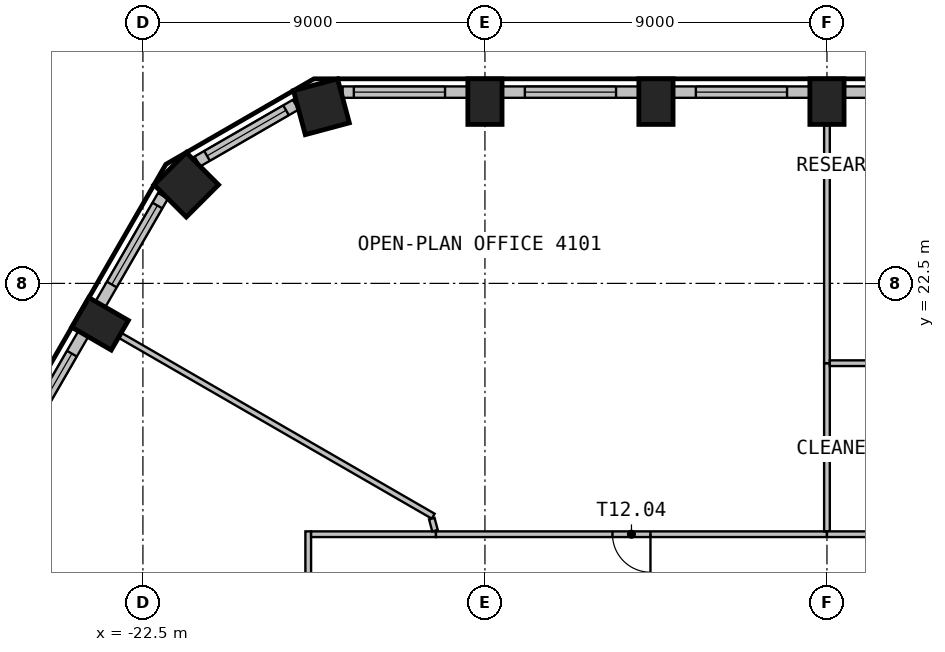
"""IFC4 building model, lengths in metres.
Left out: names, types, materials, properties, quantities, classifications, styles, units other than length and angle.
Written with IfcOpenShell. Run it as: python <this file> out.ifc"""

import sys

from ifc_helpers import new_model, si_unit, direction, frame, frame_2d, origin, origin_2d, place, context, subcontext, project, spatial, rectangle, extrude, element, fill, save


model = new_model("IFC4")
c1 = context("Model", 3, precision=1e-05, world=origin(), true_north=direction((0.0, 1.0)))
c2 = subcontext(c1, "Body", "Model", "MODEL_VIEW")
j1 = project(units=[si_unit("LENGTHUNIT", "METRE"), si_unit("PLANEANGLEUNIT", "RADIAN")], contexts=[c1])
p1 = place(None, origin())
s1 = spatial("IfcSite", under=j1, at=p1, CompositionType="ELEMENT")
p2 = place(p1, origin())
s2 = spatial("IfcBuilding", under=s1, at=p2, CompositionType="ELEMENT")
p3 = place(p2, frame((0.0, 0.0, 167.7)))
s3 = spatial("IfcBuildingStorey", under=s2, at=p3, CompositionType="ELEMENT", Elevation=167.7)
for number, where, z_axis, x_axis in (
    (1, (-4.5, 27.283, 0.0), (0.0, 0.0, 1.0), (-1.0, 0.0, 0.0)),
    (2, (-9.0, 27.283, 0.0), (0.0, 0.0, 1.0), (-1.0, 0.0, 0.0)),
    (3, (-13.5, 27.283, 0.0), (0.0, 0.0, 1.0), (-1.0, 0.0, 0.0)),
):
    element("IfcColumn", number, at=place(p3, frame(where, z_axis=z_axis, x_axis=x_axis)), inside=s3, PredefinedType="COLUMN", context=c2, shape_type="SweptSolid", body=[
        extrude(rectangle(XDim=0.9, YDim=1.2, at=origin_2d()), origin(), (0.0, 0.0, 1.0), 3.575),
    ])
for number, where, z_axis, x_axis in (
    (4, (-17.803, 27.148, 0.0), (0.0, 0.0, 1.0), (-0.966, -0.259, 0.0)),
    (5, (-21.359, 25.095, 0.0), (0.0, 0.0, 1.0), (-0.707, -0.707, 0.0)),
):
    element("IfcColumn", number, at=place(p3, frame(where, z_axis=z_axis, x_axis=x_axis)), inside=s3, PredefinedType="COLUMN", context=c2, shape_type="SweptSolid", body=[
        extrude(rectangle(XDim=1.2, YDim=1.2, at=origin_2d()), origin(), (0.0, 0.0, 1.0), 3.575),
    ])
p4 = place(p3, frame((-23.627, 21.436, 0.0), z_axis=(0.0, 0.0, 1.0), x_axis=(-0.5, -0.866025403784, 0.0)))
e6 = element("IfcColumn", 6, at=p4, inside=s3, PredefinedType="COLUMN", context=c2, shape_type="SweptSolid", body=[
    extrude(rectangle(XDim=0.9, YDim=1.2, at=origin_2d()), origin(), (0.0, 0.0, 1.0), 3.575),
])
p5 = place(p3, frame((-0.45, 27.533, 0.0), z_axis=(0.0, 0.0, 1.0), x_axis=(-1.0, 0.0, 0.0)))
e7 = element("IfcWall", 7, at=p5, inside=s3, PredefinedType="SOLIDWALL", context=c2, shape_type="SweptSolid", body=[
    extrude(rectangle(XDim=3.599, YDim=0.3, at=frame_2d((1.8, 0.0))), origin(), (0.0, 0.0, 1.0), 3.575),
])
p6 = place(p5, frame((0.6, 0.0, 0.9)))
e8 = element("IfcOpeningElement", 8, at=p6, cuts=e7, PredefinedType="OPENING", context=c2, shape_type="SweptSolid", body=[
    extrude(rectangle(XDim=2.4, YDim=2.1, at=frame_2d((1.2, 1.05))), frame((0.0, 0.16, 0.0), z_axis=(0.0, -1.0, 0.0), x_axis=(1.0, 0.0, 0.0)), (0.0, 0.0, 1.0), 0.32),
])
p7 = place(p3, frame((-4.95, 27.533, 0.0), z_axis=(0.0, 0.0, 1.0), x_axis=(-1.0, 0.0, 0.0)))
e9 = element("IfcWall", 9, at=p7, inside=s3, PredefinedType="SOLIDWALL", context=c2, shape_type="SweptSolid", body=[
    extrude(rectangle(XDim=3.599, YDim=0.3, at=frame_2d((1.8, 0.0))), origin(), (0.0, 0.0, 1.0), 3.575),
])
p8 = place(p7, frame((0.6, 0.0, 0.9)))
e10 = element("IfcOpeningElement", 10, at=p8, cuts=e9, PredefinedType="OPENING", context=c2, shape_type="SweptSolid", body=[
    extrude(rectangle(XDim=2.4, YDim=2.1, at=frame_2d((1.2, 1.05))), frame((0.0, 0.16, 0.0), z_axis=(0.0, -1.0, 0.0), x_axis=(1.0, 0.0, 0.0)), (0.0, 0.0, 1.0), 0.32),
])
p9 = place(p3, frame((-9.45, 27.533, 0.0), z_axis=(0.0, 0.0, 1.0), x_axis=(-1.0, 0.0, 0.0)))
e11 = element("IfcWall", 11, at=p9, inside=s3, PredefinedType="SOLIDWALL", context=c2, shape_type="SweptSolid", body=[
    extrude(rectangle(XDim=3.599, YDim=0.3, at=frame_2d((1.8, 0.0))), origin(), (0.0, 0.0, 1.0), 3.575),
])
p10 = place(p9, frame((0.6, 0.0, 0.9)))
e12 = element("IfcOpeningElement", 12, at=p10, cuts=e11, PredefinedType="OPENING", context=c2, shape_type="SweptSolid", body=[
    extrude(rectangle(XDim=2.4, YDim=2.1, at=frame_2d((1.2, 1.05))), frame((0.0, 0.16, 0.0), z_axis=(0.0, -1.0, 0.0), x_axis=(1.0, 0.0, 0.0)), (0.0, 0.0, 1.0), 0.32),
])
p11 = place(p3, frame((-13.95, 27.533, 0.0), z_axis=(0.0, 0.0, 1.0), x_axis=(-1.0, 0.0, 0.0)))
e13 = element("IfcWall", 13, at=p11, inside=s3, PredefinedType="SOLIDWALL", context=c2, shape_type="SweptSolid", body=[
    extrude(rectangle(XDim=3.294, YDim=0.3, at=frame_2d((1.647, 0.0))), origin(), (0.0, 0.0, 1.0), 3.575),
])
p12 = place(p11, frame((0.6, 0.0, 0.9)))
e14 = element("IfcOpeningElement", 14, at=p12, cuts=e13, PredefinedType="OPENING", context=c2, shape_type="SweptSolid", body=[
    extrude(rectangle(XDim=2.4, YDim=2.1, at=frame_2d((1.2, 1.05))), frame((0.0, 0.16, 0.0), z_axis=(0.0, -1.0, 0.0), x_axis=(1.0, 0.0, 0.0)), (0.0, 0.0, 1.0), 0.32),
])
p13 = place(p3, frame((-18.479, 27.202, 0.0), z_axis=(0.0, 0.0, 1.0), x_axis=(-0.866012844897, -0.500021752, 0.0)))
e15 = element("IfcWall", 15, at=p13, inside=s3, PredefinedType="SOLIDWALL", context=c2, shape_type="SweptSolid", body=[
    extrude(rectangle(XDim=2.989, YDim=0.3, at=frame_2d((1.495, 0.0))), origin(), (0.0, 0.0, 1.0), 3.575),
])
p14 = place(p13, frame((0.295, 0.0, 0.9)))
e16 = element("IfcOpeningElement", 16, at=p14, cuts=e15, PredefinedType="OPENING", context=c2, shape_type="SweptSolid", body=[
    extrude(rectangle(XDim=2.4, YDim=2.1, at=frame_2d((1.2, 1.05))), frame((0.0, 0.16, 0.0), z_axis=(0.0, -1.0, 0.0), x_axis=(1.0, 0.0, 0.0)), (0.0, 0.0, 1.0), 0.32),
])
p15 = place(p3, frame((-21.972, 24.803, 0.0), z_axis=(0.0, 0.0, 1.0), x_axis=(-0.500036802197, -0.866004154983, 0.0)))
e17 = element("IfcWall", 17, at=p15, inside=s3, PredefinedType="SOLIDWALL", context=c2, shape_type="SweptSolid", body=[
    extrude(rectangle(XDim=3.294, YDim=0.3, at=frame_2d((1.647, 0.0))), origin(), (0.0, 0.0, 1.0), 3.575),
])
p16 = place(p15, frame((0.294, 0.0, 0.9)))
e18 = element("IfcOpeningElement", 18, at=p16, cuts=e17, PredefinedType="OPENING", context=c2, shape_type="SweptSolid", body=[
    extrude(rectangle(XDim=2.4, YDim=2.1, at=frame_2d((1.2, 1.05))), frame((0.0, 0.16, 0.0), z_axis=(0.0, -1.0, 0.0), x_axis=(1.0, 0.0, 0.0)), (0.0, 0.0, 1.0), 0.32),
])
p17 = place(p3, frame((-24.069, 21.17, 0.0), z_axis=(0.0, 0.0, 1.0), x_axis=(-0.500027802648, -0.866009351323, 0.0)))
e19 = element("IfcWall", 19, at=p17, inside=s3, PredefinedType="SOLIDWALL", context=c2, shape_type="SweptSolid", body=[
    extrude(rectangle(XDim=3.599, YDim=0.3, at=frame_2d((1.799, 0.0))), origin(), (0.0, 0.0, 1.0), 3.575),
])
p18 = place(p17, frame((0.6, 0.0, 0.9)))
e20 = element("IfcOpeningElement", 20, at=p18, cuts=e19, PredefinedType="OPENING", context=c2, shape_type="SweptSolid", body=[
    extrude(rectangle(XDim=2.4, YDim=2.1, at=frame_2d((1.2, 1.05))), frame((0.0, 0.16, 0.0), z_axis=(0.0, -1.0, 0.0), x_axis=(1.0, 0.0, 0.0)), (0.0, 0.0, 1.0), 0.32),
])
p19 = place(p3, frame((-23.09, 21.126, 0.0), z_axis=(0.0, 0.0, 1.0), x_axis=(0.866011447264, -0.500024172624, 0.0)))
e21 = element("IfcWall", 21, at=p19, inside=s3, PredefinedType="PARTITIONING", context=c2, shape_type="SweptSolid", body=[
    extrude(rectangle(XDim=9.502, YDim=0.15, at=frame_2d((4.751, 0.0))), origin(), (0.0, 0.0, 1.0), 3.575),
])
p20 = place(p3, frame((-18.15, 15.975, 0.0), z_axis=(0.0, 0.0, 1.0), x_axis=(0.0, -1.0, 0.0)))
e22 = element("IfcWall", 22, at=p20, inside=s3, PredefinedType="PARTITIONING", context=c2, shape_type="SweptSolid", body=[
    extrude(rectangle(XDim=13.604, YDim=0.15, at=frame_2d((6.802, 0.0))), origin(), (0.0, 0.0, 1.0), 3.575),
])
p21 = place(p20, frame((6.302, 0.0, 0.0)))
e23 = element("IfcOpeningElement", 23, at=p21, cuts=e22, PredefinedType="OPENING", context=c2, shape_type="SweptSolid", body=[
    extrude(rectangle(XDim=1.0, YDim=2.1, at=frame_2d((0.5, 1.05))), frame((0.0, 0.085, 0.0), z_axis=(0.0, -1.0, 0.0), x_axis=(1.0, 0.0, 0.0)), (0.0, 0.0, 1.0), 0.17),
])
p22 = place(p3, frame((-14.789, 15.9, 0.0), z_axis=(0.0, 0.0, 1.0), x_axis=(-1.0, 0.0, 0.0)))
e24 = element("IfcWall", 24, at=p22, inside=s3, PredefinedType="PARTITIONING", context=c2, shape_type="SweptSolid", body=[
    extrude(rectangle(XDim=3.286, YDim=0.15, at=frame_2d((1.643, 0.0))), origin(), (0.0, 0.0, 1.0), 3.575),
])
p23 = place(p3, frame((-14.899, 16.311, 0.0), z_axis=(0.0, 0.0, 1.0), x_axis=(0.257478443243, -0.966284042746, 0.0)))
e25 = element("IfcWall", 25, at=p23, inside=s3, PredefinedType="PARTITIONING", context=c2, shape_type="SweptSolid", body=[
    extrude(rectangle(XDim=0.33, YDim=0.15, at=frame_2d((0.165, 0.0))), origin(), (0.0, 0.0, 1.0), 3.575),
])
p24 = place(p3, frame((-4.5, 15.9, 0.0), z_axis=(0.0, 0.0, 1.0), x_axis=(-1.0, 0.0, 0.0)))
e26 = element("IfcWall", 26, at=p24, inside=s3, PredefinedType="PARTITIONING", context=c2, shape_type="SweptSolid", body=[
    extrude(rectangle(XDim=10.289, YDim=0.15, at=frame_2d((5.145, 0.0))), origin(), (0.0, 0.0, 1.0), 3.575),
])
p25 = place(p24, frame((4.645, 0.0, 0.0)))
e27 = element("IfcOpeningElement", 27, at=p25, cuts=e26, PredefinedType="OPENING", context=c2, shape_type="SweptSolid", body=[
    extrude(rectangle(XDim=1.0, YDim=2.1, at=frame_2d((0.5, 1.05))), frame((0.0, 0.085, 0.0), z_axis=(0.0, -1.0, 0.0), x_axis=(1.0, 0.0, 0.0)), (0.0, 0.0, 1.0), 0.17),
])
p26 = place(p3, frame((-4.5, 20.4, 0.0), z_axis=(0.0, 0.0, 1.0), x_axis=(0.0, -1.0, 0.0)))
e28 = element("IfcWall", 28, at=p26, inside=s3, PredefinedType="PARTITIONING", context=c2, shape_type="SweptSolid", body=[
    extrude(rectangle(XDim=4.425, YDim=0.15, at=frame_2d((2.212, 0.0))), origin(), (0.0, 0.0, 1.0), 3.575),
])
p27 = place(p3, frame((0.075, 15.9, 0.0), z_axis=(0.0, 0.0, 1.0), x_axis=(-1.0, 0.0, 0.0)))
e29 = element("IfcWall", 29, at=p27, inside=s3, PredefinedType="PARTITIONING", context=c2, shape_type="SweptSolid", body=[
    extrude(rectangle(XDim=4.575, YDim=0.15, at=frame_2d((2.288, 0.0))), origin(), (0.0, 0.0, 1.0), 3.575),
])
p28 = place(p27, frame((1.788, 0.0, 0.0)))
e30 = element("IfcOpeningElement", 30, at=p28, cuts=e29, PredefinedType="OPENING", context=c2, shape_type="SweptSolid", body=[
    extrude(rectangle(XDim=1.0, YDim=2.1, at=frame_2d((0.5, 1.05))), frame((0.0, 0.085, 0.0), z_axis=(0.0, -1.0, 0.0), x_axis=(1.0, 0.0, 0.0)), (0.0, 0.0, 1.0), 0.17),
])
p29 = place(p3, frame((-4.5, 26.663, 0.0), z_axis=(0.0, 0.0, 1.0), x_axis=(0.0, -1.0, 0.0)))
e31 = element("IfcWall", 31, at=p29, inside=s3, PredefinedType="PARTITIONING", context=c2, shape_type="SweptSolid", body=[
    extrude(rectangle(XDim=6.263, YDim=0.15, at=frame_2d((3.131, 0.0))), origin(), (0.0, 0.0, 1.0), 3.575),
])
p30 = place(p3, frame((-4.425, 20.4, 0.0), z_axis=(0.0, 0.0, 1.0), x_axis=(1.0, 0.0, 0.0)))
e32 = element("IfcWall", 32, at=p30, inside=s3, PredefinedType="PARTITIONING", context=c2, shape_type="SweptSolid", body=[
    extrude(rectangle(XDim=4.35, YDim=0.15, at=frame_2d((2.175, 0.0))), origin(), (0.0, 0.0, 1.0), 3.575),
])
p31 = place(p8, origin())
e33 = element("IfcWindow", 33, at=p31, inside=s3, PartitioningType="SINGLE_PANEL", PredefinedType="WINDOW", context=c2, shape_type="SweptSolid", body=[
    extrude(rectangle(XDim=2.4, YDim=2.1, at=frame_2d((1.2, 1.05))), frame((0.0, 0.03, 0.0), z_axis=(0.0, -1.0, 0.0), x_axis=(1.0, 0.0, 0.0)), (0.0, 0.0, 1.0), 0.06),
])
fill(e10, e33)
p32 = place(p10, origin())
e34 = element("IfcWindow", 34, at=p32, inside=s3, PartitioningType="SINGLE_PANEL", PredefinedType="WINDOW", context=c2, shape_type="SweptSolid", body=[
    extrude(rectangle(XDim=2.4, YDim=2.1, at=frame_2d((1.2, 1.05))), frame((0.0, 0.03, 0.0), z_axis=(0.0, -1.0, 0.0), x_axis=(1.0, 0.0, 0.0)), (0.0, 0.0, 1.0), 0.06),
])
fill(e12, e34)
p33 = place(p12, origin())
e35 = element("IfcWindow", 35, at=p33, inside=s3, PartitioningType="SINGLE_PANEL", PredefinedType="WINDOW", context=c2, shape_type="SweptSolid", body=[
    extrude(rectangle(XDim=2.4, YDim=2.1, at=frame_2d((1.2, 1.05))), frame((0.0, 0.03, 0.0), z_axis=(0.0, -1.0, 0.0), x_axis=(1.0, 0.0, 0.0)), (0.0, 0.0, 1.0), 0.06),
])
fill(e14, e35)
p34 = place(p14, origin())
e36 = element("IfcWindow", 36, at=p34, inside=s3, PartitioningType="SINGLE_PANEL", PredefinedType="WINDOW", context=c2, shape_type="SweptSolid", body=[
    extrude(rectangle(XDim=2.4, YDim=2.1, at=frame_2d((1.2, 1.05))), frame((0.0, 0.03, 0.0), z_axis=(0.0, -1.0, 0.0), x_axis=(1.0, 0.0, 0.0)), (0.0, 0.0, 1.0), 0.06),
])
fill(e16, e36)
p35 = place(p16, origin())
e37 = element("IfcWindow", 37, at=p35, inside=s3, PartitioningType="SINGLE_PANEL", PredefinedType="WINDOW", context=c2, shape_type="SweptSolid", body=[
    extrude(rectangle(XDim=2.4, YDim=2.1, at=frame_2d((1.2, 1.05))), frame((0.0, 0.03, 0.0), z_axis=(0.0, -1.0, 0.0), x_axis=(1.0, 0.0, 0.0)), (0.0, 0.0, 1.0), 0.06),
])
fill(e18, e37)
p36 = place(p18, origin())
e38 = element("IfcWindow", 38, at=p36, inside=s3, PartitioningType="SINGLE_PANEL", PredefinedType="WINDOW", context=c2, shape_type="SweptSolid", body=[
    extrude(rectangle(XDim=2.4, YDim=2.1, at=frame_2d((1.2, 1.05))), frame((0.0, 0.03, 0.0), z_axis=(0.0, -1.0, 0.0), x_axis=(1.0, 0.0, 0.0)), (0.0, 0.0, 1.0), 0.06),
])
fill(e20, e38)
p37 = place(p25, origin())
e39 = element("IfcDoor", 39, at=p37, inside=s3, OperationType="SINGLE_SWING_LEFT", PredefinedType="DOOR", context=c2, shape_type="SweptSolid", body=[
    extrude(rectangle(XDim=1.0, YDim=2.1, at=frame_2d((0.5, 1.05))), frame((0.0, 0.025, 0.0), z_axis=(0.0, -1.0, 0.0), x_axis=(1.0, 0.0, 0.0)), (0.0, 0.0, 1.0), 0.05),
])
fill(e27, e39)
save(model, sys.argv[1])
